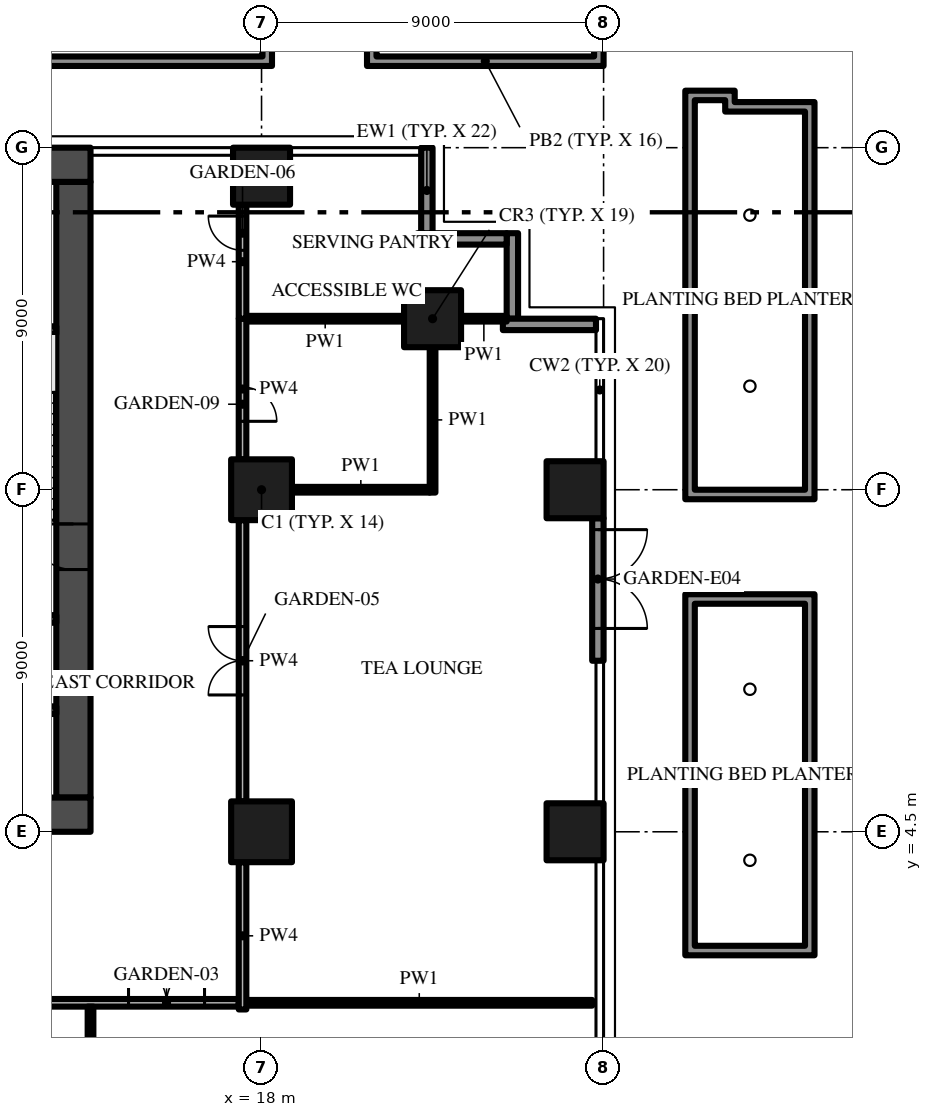
"""IFC4 building model, lengths in metres.
Left out: names, types, materials, properties, quantities, classifications, styles, units other than length and angle.
Written with IfcOpenShell. Run it as: python <this file> out.ifc"""

import sys

from ifc_helpers import new_model, si_unit, direction, frame, frame_2d, origin, origin_2d, place, context, subcontext, project, spatial, polyline, rectangle, outline, extrude, element, fill, save


model = new_model("IFC4")
c1 = context("Model", 3, precision=1e-05, world=origin(), true_north=direction((0.0, 1.0)))
c2 = subcontext(c1, "Body", "Model", "MODEL_VIEW")
j1 = project(units=[si_unit("LENGTHUNIT", "METRE"), si_unit("PLANEANGLEUNIT", "RADIAN")], contexts=[c1])
p1 = place(None, origin())
s1 = spatial("IfcSite", under=j1, at=p1, CompositionType="ELEMENT")
p2 = place(p1, origin())
s2 = spatial("IfcBuilding", under=s1, at=p2, CompositionType="ELEMENT")
p3 = place(p2, frame((0.0, 0.0, 10.5)))
s3 = spatial("IfcBuildingStorey", under=s2, at=p3, CompositionType="ELEMENT", Elevation=10.5)
p4 = place(p3, frame((-13.5, 4.95, -0.35), z_axis=(0.0, 0.0, 1.0), x_axis=(1.0, 0.0, 0.0)))
e1 = element("IfcWall", 1, at=p4, inside=s3, PredefinedType="SHEAR", context=c2, shape_type="SweptSolid", body=[
    extrude(rectangle(XDim=27.0, YDim=0.9, at=frame_2d((13.5, 0.0))), origin(), (0.0, 0.0, 1.0), 4.55),
])
p5 = place(p4, frame((12.0, 0.0, 0.35)))
e2 = element("IfcOpeningElement", 2, at=p5, cuts=e1, PredefinedType="OPENING", context=c2, shape_type="SweptSolid", body=[
    extrude(rectangle(XDim=3.0, YDim=2.4, at=frame_2d((1.5, 1.2))), frame((0.0, 0.46, 0.0), z_axis=(0.0, -1.0, 0.0), x_axis=(1.0, 0.0, 0.0)), (0.0, 0.0, 1.0), 0.92),
])
p6 = place(p4, frame((4.9, 0.0, 0.35)))
e3 = element("IfcOpeningElement", 3, at=p6, cuts=e1, PredefinedType="OPENING", context=c2, shape_type="SweptSolid", body=[
    extrude(rectangle(XDim=1.2, YDim=2.2, at=frame_2d((0.6, 1.1))), frame((0.0, 0.46, 0.0), z_axis=(0.0, -1.0, 0.0), x_axis=(1.0, 0.0, 0.0)), (0.0, 0.0, 1.0), 0.92),
])
p7 = place(p4, frame((20.75, 0.0, 0.35)))
e4 = element("IfcOpeningElement", 4, at=p7, cuts=e1, PredefinedType="OPENING", context=c2, shape_type="SweptSolid", body=[
    extrude(rectangle(XDim=1.5, YDim=2.2, at=frame_2d((0.75, 1.1))), frame((0.0, 0.46, 0.0), z_axis=(0.0, -1.0, 0.0), x_axis=(1.0, 0.0, 0.0)), (0.0, 0.0, 1.0), 0.92),
])
p8 = place(p4, frame((17.4, 0.0, 0.35)))
e5 = element("IfcOpeningElement", 5, at=p8, cuts=e1, PredefinedType="OPENING", context=c2, shape_type="SweptSolid", body=[
    extrude(rectangle(XDim=1.2, YDim=2.2, at=frame_2d((0.6, 1.1))), frame((0.0, 0.46, 0.0), z_axis=(0.0, -1.0, 0.0), x_axis=(1.0, 0.0, 0.0)), (0.0, 0.0, 1.0), 0.92),
])
p9 = place(p3, frame((13.05, 5.4, -0.35), z_axis=(0.0, 0.0, 1.0), x_axis=(0.0, 1.0, 0.0)))
e6 = element("IfcWall", 6, at=p9, inside=s3, PredefinedType="SHEAR", context=c2, shape_type="SweptSolid", body=[
    extrude(rectangle(XDim=16.2, YDim=0.9, at=frame_2d((8.1, 0.0))), origin(), (0.0, 0.0, 1.0), 4.55),
])
p10 = place(p9, frame((6.0, 0.0, 0.35)))
e7 = element("IfcOpeningElement", 7, at=p10, cuts=e6, PredefinedType="OPENING", context=c2, shape_type="SweptSolid", body=[
    extrude(rectangle(XDim=1.2, YDim=2.2, at=frame_2d((0.6, 1.1))), frame((0.0, 0.46, 0.0), z_axis=(0.0, -1.0, 0.0), x_axis=(1.0, 0.0, 0.0)), (0.0, 0.0, 1.0), 0.92),
])
p11 = place(p3, frame((13.5, 22.05, -0.35), z_axis=(0.0, 0.0, 1.0), x_axis=(-1.0, 0.0, 0.0)))
e8 = element("IfcWall", 8, at=p11, inside=s3, PredefinedType="SHEAR", context=c2, shape_type="SweptSolid", body=[
    extrude(rectangle(XDim=27.0, YDim=0.9, at=frame_2d((13.5, 0.0))), origin(), (0.0, 0.0, 1.0), 4.55),
])
p12 = place(p3, frame((18.0, 13.5, 0.0), z_axis=(0.0, 0.0, 1.0), x_axis=(1.0, 0.0, 0.0)))
e9 = element("IfcColumn", 9, at=p12, inside=s3, PredefinedType="COLUMN", context=c2, shape_type="SweptSolid", body=[
    extrude(rectangle(XDim=1.6, YDim=1.6, at=origin_2d()), origin(), (0.0, 0.0, 1.0), 4.2),
])
p13 = place(p3, frame((18.0, 21.75, 0.0), z_axis=(0.0, 0.0, 1.0), x_axis=(1.0, 0.0, 0.0)))
e10 = element("IfcColumn", 10, at=p13, inside=s3, PredefinedType="COLUMN", context=c2, shape_type="SweptSolid", body=[
    extrude(rectangle(XDim=1.5, YDim=1.5, at=origin_2d()), origin(), (0.0, 0.0, 1.0), 4.2),
])
p14 = place(p3, frame((18.0, 4.5, 0.0), z_axis=(0.0, 0.0, 1.0), x_axis=(1.0, 0.0, 0.0)))
e11 = element("IfcColumn", 11, at=p14, inside=s3, PredefinedType="COLUMN", context=c2, shape_type="SweptSolid", body=[
    extrude(rectangle(XDim=1.6, YDim=1.6, at=origin_2d()), origin(), (0.0, 0.0, 1.0), 4.2),
])
for number, where, z_axis, x_axis in (
    (12, (26.25, 13.5, 0.0), (0.0, 0.0, 1.0), (1.0, 0.0, 0.0)),
    (13, (22.5, 18.0, 0.0), (0.0, 0.0, 1.0), (1.0, 0.0, 0.0)),
    (14, (26.25, 4.5, 0.0), (0.0, 0.0, 1.0), (1.0, 0.0, 0.0)),
):
    element("IfcColumn", number, at=place(p3, frame(where, z_axis=z_axis, x_axis=x_axis)), inside=s3, PredefinedType="COLUMN", context=c2, shape_type="SweptSolid", body=[
        extrude(rectangle(XDim=1.5, YDim=1.5, at=origin_2d()), origin(), (0.0, 0.0, 1.0), 4.2),
    ])
p15 = place(p3, frame((26.85, 12.75, 0.0), z_axis=(0.0, 0.0, 1.0), x_axis=(0.0, -1.0, 0.0)))
e15 = element("IfcWall", 15, at=p15, inside=s3, PredefinedType="SOLIDWALL", context=c2, shape_type="SweptSolid", body=[
    extrude(rectangle(XDim=3.75, YDim=0.3, at=frame_2d((1.875, 0.0))), origin(), (0.0, 0.0, 1.0), 4.2),
])
p16 = place(p15, frame((0.3, 0.0, 0.0)))
e16 = element("IfcOpeningElement", 16, at=p16, cuts=e15, PredefinedType="OPENING", context=c2, shape_type="SweptSolid", body=[
    extrude(rectangle(XDim=2.6, YDim=2.4, at=frame_2d((1.3, 1.2))), frame((0.0, 0.16, 0.0), z_axis=(0.0, -1.0, 0.0), x_axis=(1.0, 0.0, 0.0)), (0.0, 0.0, 1.0), 0.32),
])
p17 = place(p3, frame((24.35, 17.85, 0.0), z_axis=(0.0, 0.0, 1.0), x_axis=(1.0, 0.0, 0.0)))
e17 = element("IfcWall", 17, at=p17, inside=s3, PredefinedType="SOLIDWALL", context=c2, shape_type="SweptSolid", body=[
    extrude(rectangle(XDim=2.45, YDim=0.3, at=frame_2d((1.225, 0.0))), origin(), (0.0, 0.0, 1.0), 4.2),
])
p18 = place(p3, frame((24.6, 20.25, 0.0), z_axis=(0.0, 0.0, 1.0), x_axis=(0.0, -1.0, 0.0)))
e18 = element("IfcWall", 18, at=p18, inside=s3, PredefinedType="SOLIDWALL", context=c2, shape_type="SweptSolid", body=[
    extrude(rectangle(XDim=2.25, YDim=0.3, at=frame_2d((1.125, 0.0))), origin(), (0.0, 0.0, 1.0), 4.2),
])
p19 = place(p3, frame((22.1, 20.1, 0.0), z_axis=(0.0, 0.0, 1.0), x_axis=(1.0, 0.0, 0.0)))
e19 = element("IfcWall", 19, at=p19, inside=s3, PredefinedType="SOLIDWALL", context=c2, shape_type="SweptSolid", body=[
    extrude(rectangle(XDim=2.35, YDim=0.3, at=frame_2d((1.175, 0.0))), origin(), (0.0, 0.0, 1.0), 4.2),
])
p20 = place(p3, frame((22.35, 22.5, 0.0), z_axis=(0.0, 0.0, 1.0), x_axis=(0.0, -1.0, 0.0)))
e20 = element("IfcWall", 20, at=p20, inside=s3, PredefinedType="SOLIDWALL", context=c2, shape_type="SweptSolid", body=[
    extrude(rectangle(XDim=2.25, YDim=0.3, at=frame_2d((1.125, 0.0))), origin(), (0.0, 0.0, 1.0), 4.2),
])
for number, where, z_axis, x_axis in (
    (21, (9.65, 7.7, 0.0), (0.0, 0.0, 1.0), (1.0, 0.0, 0.0)),
    (22, (9.65, 10.1, 0.0), (0.0, 0.0, 1.0), (1.0, 0.0, 0.0)),
    (23, (9.65, 17.7, 0.0), (0.0, 0.0, 1.0), (1.0, 0.0, 0.0)),
):
    element("IfcWall", number, at=place(p3, frame(where, z_axis=z_axis, x_axis=x_axis)), inside=s3, PredefinedType="SHEAR", context=c2, shape_type="SweptSolid", body=[
        extrude(rectangle(XDim=2.95, YDim=0.2, at=frame_2d((1.475, 0.0))), origin(), (0.0, 0.0, 1.0), 4.2),
    ])
p21 = place(p3, frame((-17.4, 0.0, 0.0), z_axis=(0.0, 0.0, 1.0), x_axis=(1.0, 0.0, 0.0)))
e24 = element("IfcWall", 24, at=p21, inside=s3, PredefinedType="PARTITIONING", context=c2, shape_type="SweptSolid", body=[
    extrude(rectangle(XDim=34.8, YDim=0.2, at=frame_2d((17.4, 0.0))), origin(), (0.0, 0.0, 1.0), 4.2),
])
p22 = place(p21, frame((0.9, 0.0, 0.0)))
e25 = element("IfcOpeningElement", 25, at=p22, cuts=e24, PredefinedType="OPENING", context=c2, shape_type="SweptSolid", body=[
    extrude(rectangle(XDim=2.0, YDim=2.4, at=frame_2d((1.0, 1.2))), frame((0.0, 0.11, 0.0), z_axis=(0.0, -1.0, 0.0), x_axis=(1.0, 0.0, 0.0)), (0.0, 0.0, 1.0), 0.22),
])
p23 = place(p21, frame((16.4, 0.0, 0.0)))
e26 = element("IfcOpeningElement", 26, at=p23, cuts=e24, PredefinedType="OPENING", context=c2, shape_type="SweptSolid", body=[
    extrude(rectangle(XDim=2.0, YDim=2.4, at=frame_2d((1.0, 1.2))), frame((0.0, 0.11, 0.0), z_axis=(0.0, -1.0, 0.0), x_axis=(1.0, 0.0, 0.0)), (0.0, 0.0, 1.0), 0.22),
])
p24 = place(p21, frame((31.9, 0.0, 0.0)))
e27 = element("IfcOpeningElement", 27, at=p24, cuts=e24, PredefinedType="OPENING", context=c2, shape_type="SweptSolid", body=[
    extrude(rectangle(XDim=2.0, YDim=2.4, at=frame_2d((1.0, 1.2))), frame((0.0, 0.11, 0.0), z_axis=(0.0, -1.0, 0.0), x_axis=(1.0, 0.0, 0.0)), (0.0, 0.0, 1.0), 0.22),
])
p25 = place(p3, frame((17.6, 0.0, 0.0), z_axis=(0.0, 0.0, 1.0), x_axis=(1.0, 0.0, 0.0)))
e28 = element("IfcWall", 28, at=p25, inside=s3, PredefinedType="PARTITIONING", context=c2, shape_type="SweptSolid", body=[
    extrude(rectangle(XDim=9.1, YDim=0.15, at=frame_2d((4.55, 0.0))), origin(), (0.0, 0.0, 1.0), 4.2),
])
p26 = place(p3, frame((18.8, 13.5, 0.0), z_axis=(0.0, 0.0, 1.0), x_axis=(1.0, 0.0, 0.0)))
e29 = element("IfcWall", 29, at=p26, inside=s3, PredefinedType="PARTITIONING", context=c2, shape_type="SweptSolid", body=[
    extrude(rectangle(XDim=3.625, YDim=0.15, at=frame_2d((1.812, 0.0))), origin(), (0.0, 0.0, 1.0), 4.2),
])
p27 = place(p3, frame((17.6, 18.0, 0.0), z_axis=(0.0, 0.0, 1.0), x_axis=(1.0, 0.0, 0.0)))
e30 = element("IfcWall", 30, at=p27, inside=s3, PredefinedType="PARTITIONING", context=c2, shape_type="SweptSolid", body=[
    extrude(rectangle(XDim=4.15, YDim=0.15, at=frame_2d((2.075, 0.0))), origin(), (0.0, 0.0, 1.0), 4.2),
])
p28 = place(p3, frame((23.25, 18.0, 0.0), z_axis=(0.0, 0.0, 1.0), x_axis=(1.0, 0.0, 0.0)))
e31 = element("IfcWall", 31, at=p28, inside=s3, PredefinedType="PARTITIONING", context=c2, shape_type="SweptSolid", body=[
    extrude(rectangle(XDim=1.2, YDim=0.15, at=frame_2d((0.6, 0.0))), origin(), (0.0, 0.0, 1.0), 4.2),
])
p29 = place(p3, frame((13.5, -22.2, 0.0), z_axis=(0.0, 0.0, 1.0), x_axis=(0.0, 1.0, 0.0)))
e32 = element("IfcWall", 32, at=p29, inside=s3, PredefinedType="PARTITIONING", context=c2, shape_type="SweptSolid", body=[
    extrude(rectangle(XDim=22.1, YDim=0.15, at=frame_2d((11.05, 0.0))), origin(), (0.0, 0.0, 1.0), 4.2),
])
p30 = place(p3, frame((17.5, -0.175, 0.0), z_axis=(0.0, 0.0, 1.0), x_axis=(0.0, 1.0, 0.0)))
e33 = element("IfcWall", 33, at=p30, inside=s3, PredefinedType="PARTITIONING", context=c2, shape_type="SweptSolid", body=[
    extrude(rectangle(XDim=3.875, YDim=0.2, at=frame_2d((1.938, 0.0))), origin(), (0.0, 0.0, 1.0), 4.2),
])
p31 = place(p3, frame((17.5, 5.3, 0.0), z_axis=(0.0, 0.0, 1.0), x_axis=(0.0, 1.0, 0.0)))
e34 = element("IfcWall", 34, at=p31, inside=s3, PredefinedType="PARTITIONING", context=c2, shape_type="SweptSolid", body=[
    extrude(rectangle(XDim=7.4, YDim=0.2, at=frame_2d((3.7, 0.0))), origin(), (0.0, 0.0, 1.0), 4.2),
])
p32 = place(p31, frame((2.8, 0.0, 0.0)))
e35 = element("IfcOpeningElement", 35, at=p32, cuts=e34, PredefinedType="OPENING", context=c2, shape_type="SweptSolid", body=[
    extrude(rectangle(XDim=1.8, YDim=2.4, at=frame_2d((0.9, 1.2))), frame((0.0, 0.11, 0.0), z_axis=(0.0, -1.0, 0.0), x_axis=(1.0, 0.0, 0.0)), (0.0, 0.0, 1.0), 0.22),
])
p33 = place(p3, frame((17.5, 18.0, 0.0), z_axis=(0.0, 0.0, 1.0), x_axis=(0.0, -1.0, 0.0)))
e36 = element("IfcWall", 36, at=p33, inside=s3, PredefinedType="PARTITIONING", context=c2, shape_type="SweptSolid", body=[
    extrude(rectangle(XDim=3.7, YDim=0.2, at=frame_2d((1.85, 0.0))), origin(), (0.0, 0.0, 1.0), 4.2),
])
p34 = place(p33, frame((1.8, 0.0, 0.0)))
e37 = element("IfcOpeningElement", 37, at=p34, cuts=e36, PredefinedType="OPENING", context=c2, shape_type="SweptSolid", body=[
    extrude(rectangle(XDim=0.9, YDim=2.1, at=frame_2d((0.45, 1.05))), frame((0.0, 0.11, 0.0), z_axis=(0.0, -1.0, 0.0), x_axis=(1.0, 0.0, 0.0)), (0.0, 0.0, 1.0), 0.22),
])
p35 = place(p3, frame((17.5, 18.0, 0.0), z_axis=(0.0, 0.0, 1.0), x_axis=(0.0, 1.0, 0.0)))
e38 = element("IfcWall", 38, at=p35, inside=s3, PredefinedType="PARTITIONING", context=c2, shape_type="SweptSolid", body=[
    extrude(rectangle(XDim=3.0, YDim=0.2, at=frame_2d((1.5, 0.0))), origin(), (0.0, 0.0, 1.0), 4.2),
])
p36 = place(p35, frame((1.8, 0.0, 0.0)))
e39 = element("IfcOpeningElement", 39, at=p36, cuts=e38, PredefinedType="OPENING", context=c2, shape_type="SweptSolid", body=[
    extrude(rectangle(XDim=0.9, YDim=2.1, at=frame_2d((0.45, 1.05))), frame((0.0, 0.11, 0.0), z_axis=(0.0, -1.0, 0.0), x_axis=(1.0, 0.0, 0.0)), (0.0, 0.0, 1.0), 0.22),
])
p37 = place(p3, frame((22.5, 13.425, 0.0), z_axis=(0.0, 0.0, 1.0), x_axis=(0.0, 1.0, 0.0)))
e40 = element("IfcWall", 40, at=p37, inside=s3, PredefinedType="PARTITIONING", context=c2, shape_type="SweptSolid", body=[
    extrude(rectangle(XDim=3.825, YDim=0.15, at=frame_2d((1.913, 0.0))), origin(), (0.0, 0.0, 1.0), 4.2),
])
p38 = place(p3, frame((0.0, 0.0, 0.05)))
e41 = element("IfcWall", 41, at=p38, inside=s3, PredefinedType="USERDEFINED", context=c2, shape_type="SweptSolid", body=[
    extrude(outline(polyline([(29.15, 1.25), (32.55, 1.25), (32.55, 10.75), (29.15, 10.75), (29.15, 1.25)]), holes=[polyline([(29.4, 10.5), (32.3, 10.5), (32.3, 1.5), (29.4, 1.5), (29.4, 10.5)])]), origin(), (0.0, 0.0, 1.0), 0.9),
])
p39 = place(p3, frame((0.0, 0.0, 0.05)))
e42 = element("IfcWall", 42, at=p39, inside=s3, PredefinedType="USERDEFINED", context=c2, shape_type="SweptSolid", body=[
    extrude(outline(polyline([(32.55, 13.25), (32.55, 23.7), (30.45, 23.7), (30.45, 24.0), (29.15, 24.0), (29.15, 13.25), (32.55, 13.25)]), holes=[polyline([(29.4, 13.5), (29.4, 23.75), (30.2, 23.75), (30.2, 23.45), (32.3, 23.45), (32.3, 13.5), (29.4, 13.5)])]), origin(), (0.0, 0.0, 1.0), 0.9),
])
p40 = place(p3, frame((0.0, 0.0, 0.05)))
e43 = element("IfcWall", 43, at=p40, inside=s3, PredefinedType="USERDEFINED", context=c2, shape_type="SweptSolid", body=[
    extrude(outline(polyline([(12.05, 24.65), (18.275, 24.65), (18.275, 28.05), (12.05, 28.05), (12.05, 24.65)]), holes=[polyline([(12.3, 27.8), (18.025, 27.8), (18.025, 24.9), (12.3, 24.9), (12.3, 27.8)])]), origin(), (0.0, 0.0, 1.0), 0.9),
])
p41 = place(p3, frame((0.0, 0.0, 0.05)))
e44 = element("IfcWall", 44, at=p41, inside=s3, PredefinedType="USERDEFINED", context=c2, shape_type="SweptSolid", body=[
    extrude(outline(polyline([(20.775, 24.65), (27.0, 24.65), (27.0, 28.05), (20.775, 28.05), (20.775, 24.65)]), holes=[polyline([(21.025, 27.8), (26.75, 27.8), (26.75, 24.9), (21.025, 24.9), (21.025, 27.8)])]), origin(), (0.0, 0.0, 1.0), 0.9),
])
p42 = place(p16, origin())
e45 = element("IfcDoor", 45, at=p42, inside=s3, OperationType="SINGLE_SWING_LEFT", PredefinedType="DOOR", context=c2, shape_type="SweptSolid", body=[
    extrude(rectangle(XDim=2.6, YDim=2.4, at=frame_2d((1.3, 1.2))), frame((0.0, 0.025, 0.0), z_axis=(0.0, -1.0, 0.0), x_axis=(1.0, 0.0, 0.0)), (0.0, 0.0, 1.0), 0.05),
])
fill(e16, e45)
p43 = place(p10, frame((1.2, 0.0, 0.0), z_axis=(0.0, 0.0, 1.0), x_axis=(-1.0, 0.0, 0.0)))
e46 = element("IfcDoor", 46, at=p43, inside=s3, OperationType="SINGLE_SWING_LEFT", PredefinedType="DOOR", context=c2, shape_type="SweptSolid", body=[
    extrude(rectangle(XDim=1.2, YDim=2.2, at=frame_2d((0.6, 1.1))), frame((0.0, 0.025, 0.0), z_axis=(0.0, -1.0, 0.0), x_axis=(1.0, 0.0, 0.0)), (0.0, 0.0, 1.0), 0.05),
])
fill(e7, e46)
p44 = place(p24, origin())
e47 = element("IfcDoor", 47, at=p44, inside=s3, OperationType="DOUBLE_DOOR_SINGLE_SWING", PredefinedType="DOOR", context=c2, shape_type="SweptSolid", body=[
    extrude(rectangle(XDim=2.0, YDim=2.4, at=frame_2d((1.0, 1.2))), frame((0.0, 0.025, 0.0), z_axis=(0.0, -1.0, 0.0), x_axis=(1.0, 0.0, 0.0)), (0.0, 0.0, 1.0), 0.05),
])
fill(e27, e47)
p45 = place(p32, origin())
e48 = element("IfcDoor", 48, at=p45, inside=s3, OperationType="DOUBLE_DOOR_SINGLE_SWING", PredefinedType="DOOR", context=c2, shape_type="SweptSolid", body=[
    extrude(rectangle(XDim=1.8, YDim=2.4, at=frame_2d((0.9, 1.2))), frame((0.0, 0.025, 0.0), z_axis=(0.0, -1.0, 0.0), x_axis=(1.0, 0.0, 0.0)), (0.0, 0.0, 1.0), 0.05),
])
fill(e35, e48)
p46 = place(p36, origin())
e49 = element("IfcDoor", 49, at=p46, inside=s3, OperationType="SINGLE_SWING_RIGHT", PredefinedType="DOOR", context=c2, shape_type="SweptSolid", body=[
    extrude(rectangle(XDim=0.9, YDim=2.1, at=frame_2d((0.45, 1.05))), frame((0.0, 0.025, 0.0), z_axis=(0.0, -1.0, 0.0), x_axis=(1.0, 0.0, 0.0)), (0.0, 0.0, 1.0), 0.05),
])
fill(e39, e49)
p47 = place(p34, origin())
e50 = element("IfcDoor", 50, at=p47, inside=s3, OperationType="SINGLE_SWING_RIGHT", PredefinedType="DOOR", context=c2, shape_type="SweptSolid", body=[
    extrude(rectangle(XDim=0.9, YDim=2.1, at=frame_2d((0.45, 1.05))), frame((0.0, 0.025, 0.0), z_axis=(0.0, -1.0, 0.0), x_axis=(1.0, 0.0, 0.0)), (0.0, 0.0, 1.0), 0.05),
])
fill(e37, e50)
save(model, sys.argv[1])
